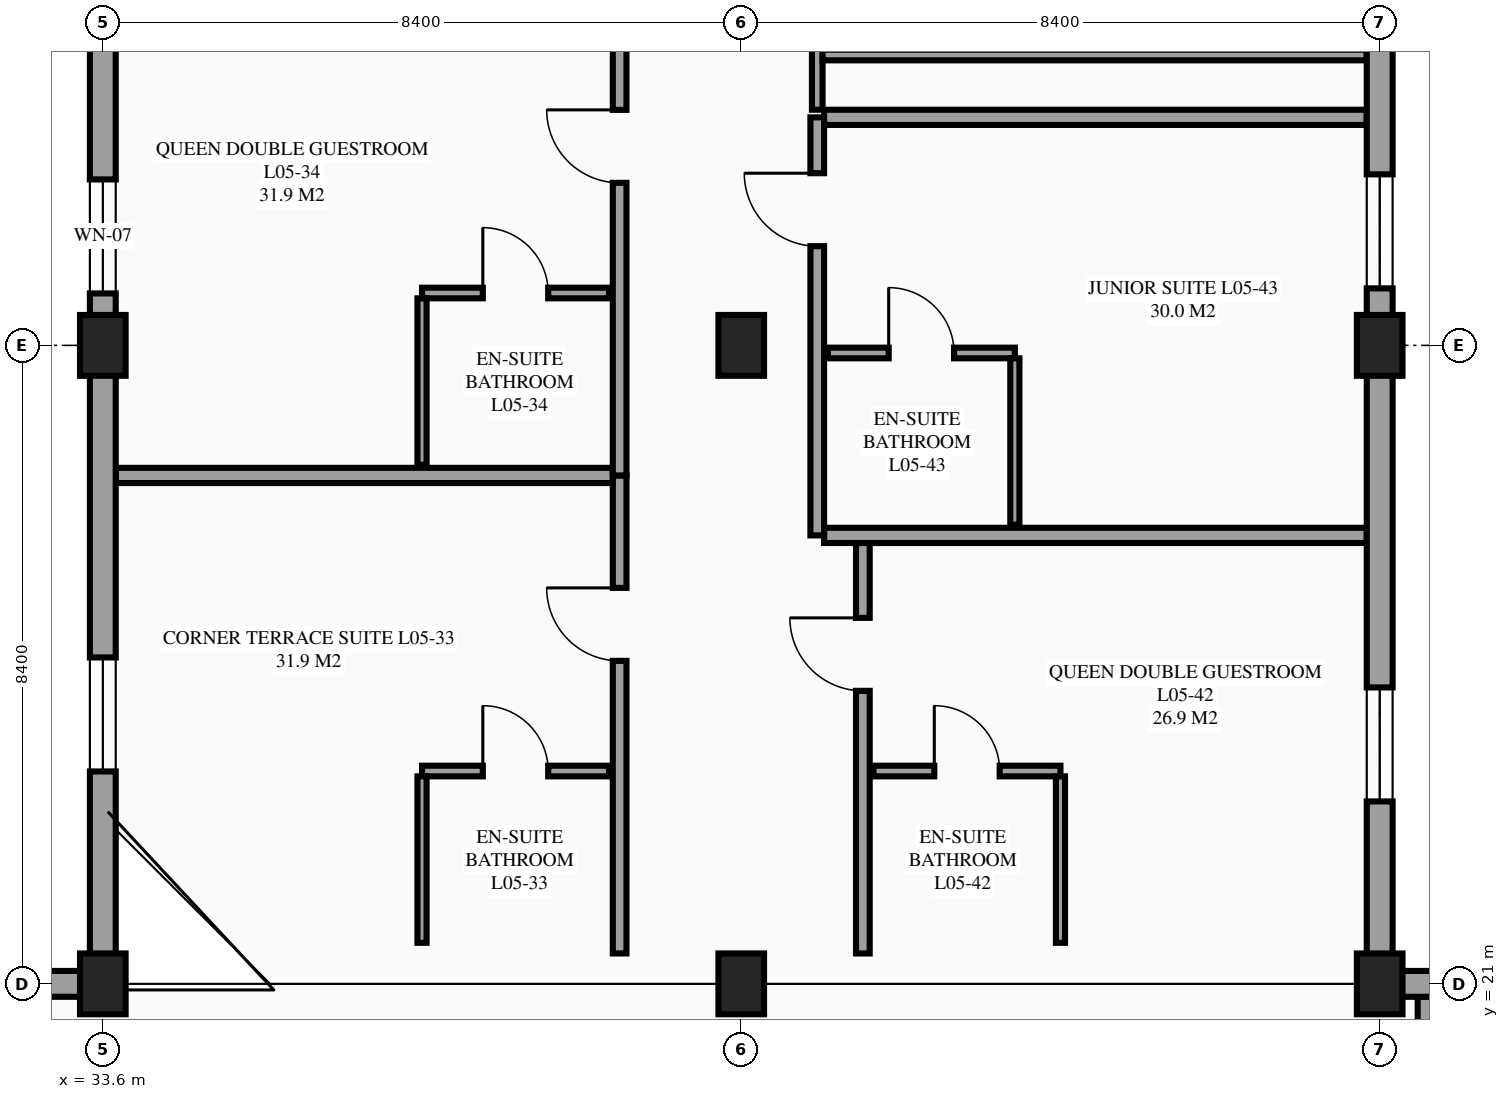
"""IFC4 building model, lengths in metres.
Left out: names, types, materials, properties, quantities, classifications, styles, units other than length and angle.
Written with IfcOpenShell. Run it as: python <this file> out.ifc"""

import sys

from ifc_helpers import new_model, si_unit, direction, frame, frame_2d, origin, origin_2d, place, context, subcontext, project, spatial, rectangle, extrude, element, fill, save


model = new_model("IFC4")
c1 = context("Model", 3, precision=1e-05, world=origin(), true_north=direction((0.0, 1.0)))
c2 = subcontext(c1, "Body", "Model", "MODEL_VIEW")
j1 = project(units=[si_unit("LENGTHUNIT", "METRE"), si_unit("PLANEANGLEUNIT", "RADIAN")], contexts=[c1])
p1 = place(None, origin())
s1 = spatial("IfcSite", under=j1, at=p1, CompositionType="ELEMENT")
p2 = place(p1, origin())
s2 = spatial("IfcBuilding", under=s1, at=p2, CompositionType="ELEMENT")
p3 = place(p2, frame((0.0, 0.0, 21.9)))
s3 = spatial("IfcBuildingStorey", under=s2, at=p3, CompositionType="ELEMENT", Elevation=21.9)
for number, where, z_axis, x_axis in (
    (1, (33.6, 21.0, 0.0), (0.0, 0.0, 1.0), (1.0, 0.0, 0.0)),
    (2, (33.6, 29.4, 0.0), (0.0, 0.0, 1.0), (1.0, 0.0, 0.0)),
    (3, (42.0, 21.0, 0.0), (0.0, 0.0, 1.0), (1.0, 0.0, 0.0)),
    (4, (42.0, 29.4, 0.0), (0.0, 0.0, 1.0), (1.0, 0.0, 0.0)),
    (5, (50.4, 21.0, 0.0), (0.0, 0.0, 1.0), (1.0, 0.0, 0.0)),
    (6, (50.4, 29.4, 0.0), (0.0, 0.0, 1.0), (1.0, 0.0, 0.0)),
):
    element("IfcColumn", number, at=place(p3, frame(where, z_axis=z_axis, x_axis=x_axis)), inside=s3, PredefinedType="COLUMN", context=c2, shape_type="SweptSolid", body=[
        extrude(rectangle(XDim=0.6, YDim=0.8, at=origin_2d()), origin(), (0.0, 0.0, 1.0), 3.6),
    ])
p4 = place(p3, frame((33.6, 46.2, 0.0), z_axis=(0.0, 0.0, 1.0), x_axis=(0.0, -1.0, 0.0)))
e7 = element("IfcWall", 7, at=p4, inside=s3, PredefinedType="STANDARD", context=c2, shape_type="SweptSolid", body=[
    extrude(rectangle(XDim=16.8, YDim=0.34, at=frame_2d((8.4, 0.0))), origin(), (0.0, 0.0, 1.0), 2.48),
])
p5 = place(p4, frame((14.617, 0.0, 0.85)))
e8 = element("IfcOpeningElement", 8, at=p5, cuts=e7, PredefinedType="OPENING", context=c2, shape_type="SweptSolid", body=[
    extrude(rectangle(XDim=1.5, YDim=1.5, at=frame_2d((0.75, 0.75))), frame((0.0, 0.18, 0.0), z_axis=(0.0, -1.0, 0.0), x_axis=(1.0, 0.0, 0.0)), (0.0, 0.0, 1.0), 0.36),
])
p6 = place(p4, frame((9.078, 0.0, 0.85)))
e9 = element("IfcOpeningElement", 9, at=p6, cuts=e7, PredefinedType="OPENING", context=c2, shape_type="SweptSolid", body=[
    extrude(rectangle(XDim=1.5, YDim=1.5, at=frame_2d((0.75, 0.75))), frame((0.0, 0.18, 0.0), z_axis=(0.0, -1.0, 0.0), x_axis=(1.0, 0.0, 0.0)), (0.0, 0.0, 1.0), 0.36),
])
p7 = place(p4, frame((2.039, 0.0, 0.85)))
e10 = element("IfcOpeningElement", 10, at=p7, cuts=e7, PredefinedType="OPENING", context=c2, shape_type="SweptSolid", body=[
    extrude(rectangle(XDim=1.5, YDim=1.5, at=frame_2d((0.75, 0.75))), frame((0.0, 0.18, 0.0), z_axis=(0.0, -1.0, 0.0), x_axis=(1.0, 0.0, 0.0)), (0.0, 0.0, 1.0), 0.36),
])
p8 = place(p3, frame((33.6, 21.0, 0.0), z_axis=(0.0, 0.0, 1.0), x_axis=(-1.0, 0.0, 0.0)))
e11 = element("IfcWall", 11, at=p8, inside=s3, PredefinedType="STANDARD", context=c2, shape_type="SweptSolid", body=[
    extrude(rectangle(XDim=2.0, YDim=0.34, at=frame_2d((1.0, 0.0))), origin(), (0.0, 0.0, 1.0), 2.58),
])
p9 = place(p3, frame((40.4, 21.4, 0.0), z_axis=(0.0, 0.0, 1.0), x_axis=(0.0, 1.0, 0.0)))
e12 = element("IfcWall", 12, at=p9, inside=s3, PredefinedType="PARTITIONING", context=c2, shape_type="SweptSolid", body=[
    extrude(rectangle(XDim=6.289, YDim=0.18, at=frame_2d((3.145, 0.0))), origin(), (0.0, 0.0, 1.0), 3.375),
])
p10 = place(p9, frame((3.849, 0.0, 0.0)))
e13 = element("IfcOpeningElement", 13, at=p10, cuts=e12, PredefinedType="OPENING", context=c2, shape_type="SweptSolid", body=[
    extrude(rectangle(XDim=0.96, YDim=2.15, at=frame_2d((0.48, 1.075))), frame((0.0, 0.1, 0.0), z_axis=(0.0, -1.0, 0.0), x_axis=(1.0, 0.0, 0.0)), (0.0, 0.0, 1.0), 0.2),
])
p11 = place(p3, frame((33.77, 27.689, 0.0), z_axis=(0.0, 0.0, 1.0), x_axis=(1.0, 0.0, 0.0)))
e14 = element("IfcWall", 14, at=p11, inside=s3, PredefinedType="PARTITIONING", context=c2, shape_type="SweptSolid", body=[
    extrude(rectangle(XDim=6.54, YDim=0.2, at=frame_2d((3.27, 0.0))), origin(), (0.0, 0.0, 1.0), 3.375),
])
p12 = place(p3, frame((37.8, 23.8, 0.0), z_axis=(0.0, 0.0, 1.0), x_axis=(1.0, 0.0, 0.0)))
e15 = element("IfcWall", 15, at=p12, inside=s3, PredefinedType="PARTITIONING", context=c2, shape_type="SweptSolid", body=[
    extrude(rectangle(XDim=2.46, YDim=0.14, at=frame_2d((1.23, 0.0))), origin(), (0.0, 0.0, 1.0), 3.375),
])
p13 = place(p12, frame((0.8, 0.0, 0.0)))
e16 = element("IfcOpeningElement", 16, at=p13, cuts=e15, PredefinedType="OPENING", context=c2, shape_type="SweptSolid", body=[
    extrude(rectangle(XDim=0.86, YDim=2.1, at=frame_2d((0.43, 1.05))), frame((0.0, 0.08, 0.0), z_axis=(0.0, -1.0, 0.0), x_axis=(1.0, 0.0, 0.0)), (0.0, 0.0, 1.0), 0.16),
])
p14 = place(p3, frame((37.8, 21.54, 0.0), z_axis=(0.0, 0.0, 1.0), x_axis=(0.0, 1.0, 0.0)))
e17 = element("IfcWall", 17, at=p14, inside=s3, PredefinedType="PARTITIONING", context=c2, shape_type="SweptSolid", body=[
    extrude(rectangle(XDim=2.19, YDim=0.12, at=frame_2d((1.095, 0.0))), origin(), (0.0, 0.0, 1.0), 3.375),
])
p15 = place(p3, frame((40.4, 27.689, 0.0), z_axis=(0.0, 0.0, 1.0), x_axis=(0.0, 1.0, 0.0)))
e18 = element("IfcWall", 18, at=p15, inside=s3, PredefinedType="PARTITIONING", context=c2, shape_type="SweptSolid", body=[
    extrude(rectangle(XDim=6.289, YDim=0.18, at=frame_2d((3.145, 0.0))), origin(), (0.0, 0.0, 1.0), 3.375),
])
p16 = place(p15, frame((3.849, 0.0, 0.0)))
e19 = element("IfcOpeningElement", 19, at=p16, cuts=e18, PredefinedType="OPENING", context=c2, shape_type="SweptSolid", body=[
    extrude(rectangle(XDim=0.96, YDim=2.15, at=frame_2d((0.48, 1.075))), frame((0.0, 0.1, 0.0), z_axis=(0.0, -1.0, 0.0), x_axis=(1.0, 0.0, 0.0)), (0.0, 0.0, 1.0), 0.2),
])
p17 = place(p3, frame((37.8, 30.089, 0.0), z_axis=(0.0, 0.0, 1.0), x_axis=(1.0, 0.0, 0.0)))
e20 = element("IfcWall", 20, at=p17, inside=s3, PredefinedType="PARTITIONING", context=c2, shape_type="SweptSolid", body=[
    extrude(rectangle(XDim=2.46, YDim=0.14, at=frame_2d((1.23, 0.0))), origin(), (0.0, 0.0, 1.0), 3.375),
])
p18 = place(p17, frame((0.8, 0.0, 0.0)))
e21 = element("IfcOpeningElement", 21, at=p18, cuts=e20, PredefinedType="OPENING", context=c2, shape_type="SweptSolid", body=[
    extrude(rectangle(XDim=0.86, YDim=2.1, at=frame_2d((0.43, 1.05))), frame((0.0, 0.08, 0.0), z_axis=(0.0, -1.0, 0.0), x_axis=(1.0, 0.0, 0.0)), (0.0, 0.0, 1.0), 0.16),
])
p19 = place(p3, frame((37.8, 27.829, 0.0), z_axis=(0.0, 0.0, 1.0), x_axis=(0.0, 1.0, 0.0)))
e22 = element("IfcWall", 22, at=p19, inside=s3, PredefinedType="PARTITIONING", context=c2, shape_type="SweptSolid", body=[
    extrude(rectangle(XDim=2.19, YDim=0.12, at=frame_2d((1.095, 0.0))), origin(), (0.0, 0.0, 1.0), 3.375),
])
p20 = place(p3, frame((43.6, 21.4, 0.0), z_axis=(0.0, 0.0, 1.0), x_axis=(0.0, 1.0, 0.0)))
e23 = element("IfcWall", 23, at=p20, inside=s3, PredefinedType="PARTITIONING", context=c2, shape_type="SweptSolid", body=[
    extrude(rectangle(XDim=5.5, YDim=0.18, at=frame_2d((2.75, 0.0))), origin(), (0.0, 0.0, 1.0), 3.375),
])
p21 = place(p20, frame((3.455, 0.0, 0.0)))
e24 = element("IfcOpeningElement", 24, at=p21, cuts=e23, PredefinedType="OPENING", context=c2, shape_type="SweptSolid", body=[
    extrude(rectangle(XDim=0.96, YDim=2.15, at=frame_2d((0.48, 1.075))), frame((0.0, 0.1, 0.0), z_axis=(0.0, -1.0, 0.0), x_axis=(1.0, 0.0, 0.0)), (0.0, 0.0, 1.0), 0.2),
])
p22 = place(p3, frame((43.09, 26.9, 0.0), z_axis=(0.0, 0.0, 1.0), x_axis=(1.0, 0.0, 0.0)))
e25 = element("IfcWall", 25, at=p22, inside=s3, PredefinedType="PARTITIONING", context=c2, shape_type="SweptSolid", body=[
    extrude(rectangle(XDim=7.14, YDim=0.2, at=frame_2d((3.57, 0.0))), origin(), (0.0, 0.0, 1.0), 3.375),
])
p23 = place(p3, frame((43.74, 23.8, 0.0), z_axis=(0.0, 0.0, 1.0), x_axis=(1.0, 0.0, 0.0)))
e26 = element("IfcWall", 26, at=p23, inside=s3, PredefinedType="PARTITIONING", context=c2, shape_type="SweptSolid", body=[
    extrude(rectangle(XDim=2.46, YDim=0.14, at=frame_2d((1.23, 0.0))), origin(), (0.0, 0.0, 1.0), 3.375),
])
p24 = place(p23, frame((0.8, 0.0, 0.0)))
e27 = element("IfcOpeningElement", 27, at=p24, cuts=e26, PredefinedType="OPENING", context=c2, shape_type="SweptSolid", body=[
    extrude(rectangle(XDim=0.86, YDim=2.1, at=frame_2d((0.43, 1.05))), frame((0.0, 0.08, 0.0), z_axis=(0.0, -1.0, 0.0), x_axis=(1.0, 0.0, 0.0)), (0.0, 0.0, 1.0), 0.16),
])
p25 = place(p3, frame((46.2, 21.54, 0.0), z_axis=(0.0, 0.0, 1.0), x_axis=(0.0, 1.0, 0.0)))
e28 = element("IfcWall", 28, at=p25, inside=s3, PredefinedType="PARTITIONING", context=c2, shape_type="SweptSolid", body=[
    extrude(rectangle(XDim=2.19, YDim=0.12, at=frame_2d((1.095, 0.0))), origin(), (0.0, 0.0, 1.0), 3.375),
])
p26 = place(p3, frame((43.0, 26.9, 0.0), z_axis=(0.0, 0.0, 1.0), x_axis=(0.0, 1.0, 0.0)))
e29 = element("IfcWall", 29, at=p26, inside=s3, PredefinedType="PARTITIONING", context=c2, shape_type="SweptSolid", body=[
    extrude(rectangle(XDim=5.5, YDim=0.18, at=frame_2d((2.75, 0.0))), origin(), (0.0, 0.0, 1.0), 3.375),
])
p27 = place(p26, frame((3.805, 0.0, 0.0)))
e30 = element("IfcOpeningElement", 30, at=p27, cuts=e29, PredefinedType="OPENING", context=c2, shape_type="SweptSolid", body=[
    extrude(rectangle(XDim=0.96, YDim=2.15, at=frame_2d((0.48, 1.075))), frame((0.0, 0.1, 0.0), z_axis=(0.0, -1.0, 0.0), x_axis=(1.0, 0.0, 0.0)), (0.0, 0.0, 1.0), 0.2),
])
p28 = place(p3, frame((43.09, 32.4, 0.0), z_axis=(0.0, 0.0, 1.0), x_axis=(1.0, 0.0, 0.0)))
e31 = element("IfcWall", 31, at=p28, inside=s3, PredefinedType="PARTITIONING", context=c2, shape_type="SweptSolid", body=[
    extrude(rectangle(XDim=7.14, YDim=0.2, at=frame_2d((3.57, 0.0))), origin(), (0.0, 0.0, 1.0), 3.375),
])
p29 = place(p3, frame((43.14, 29.3, 0.0), z_axis=(0.0, 0.0, 1.0), x_axis=(1.0, 0.0, 0.0)))
e32 = element("IfcWall", 32, at=p29, inside=s3, PredefinedType="PARTITIONING", context=c2, shape_type="SweptSolid", body=[
    extrude(rectangle(XDim=2.46, YDim=0.14, at=frame_2d((1.23, 0.0))), origin(), (0.0, 0.0, 1.0), 2.53),
])
p30 = place(p29, frame((0.8, 0.0, 0.0)))
e33 = element("IfcOpeningElement", 33, at=p30, cuts=e32, PredefinedType="OPENING", context=c2, shape_type="SweptSolid", body=[
    extrude(rectangle(XDim=0.86, YDim=2.1, at=frame_2d((0.43, 1.05))), frame((0.0, 0.08, 0.0), z_axis=(0.0, -1.0, 0.0), x_axis=(1.0, 0.0, 0.0)), (0.0, 0.0, 1.0), 0.16),
])
p31 = place(p3, frame((45.6, 27.04, 0.0), z_axis=(0.0, 0.0, 1.0), x_axis=(0.0, 1.0, 0.0)))
e34 = element("IfcWall", 34, at=p31, inside=s3, PredefinedType="PARTITIONING", context=c2, shape_type="SweptSolid", body=[
    extrude(rectangle(XDim=2.19, YDim=0.12, at=frame_2d((1.095, 0.0))), origin(), (0.0, 0.0, 1.0), 3.375),
])
p32 = place(p3, frame((51.02, 14.74, 0.0), z_axis=(0.0, 0.0, 1.0), x_axis=(0.0, 1.0, 0.0)))
e35 = element("IfcWall", 35, at=p32, inside=s3, PredefinedType="PARTITIONING", context=c2, shape_type="SweptSolid", body=[
    extrude(rectangle(XDim=6.09, YDim=0.24, at=frame_2d((3.045, 0.0))), origin(), (0.0, 0.0, 1.0), 3.375),
])
p33 = place(p3, frame((43.0, 32.5, 0.0), z_axis=(0.0, 0.0, 1.0), x_axis=(0.0, 1.0, 0.0)))
e36 = element("IfcWall", 36, at=p33, inside=s3, PredefinedType="PARTITIONING", context=c2, shape_type="SweptSolid", body=[
    extrude(rectangle(XDim=4.8, YDim=0.14, at=frame_2d((2.4, 0.0))), origin(), (0.0, 0.0, 1.0), 3.375),
])
p34 = place(p33, frame((2.05, 0.0, 0.0)))
e37 = element("IfcOpeningElement", 37, at=p34, cuts=e36, PredefinedType="OPENING", context=c2, shape_type="SweptSolid", body=[
    extrude(rectangle(XDim=0.9, YDim=2.12, at=frame_2d((0.45, 1.06))), frame((0.0, 0.08, 0.0), z_axis=(0.0, -1.0, 0.0), x_axis=(1.0, 0.0, 0.0)), (0.0, 0.0, 1.0), 0.16),
])
p35 = place(p3, frame((43.07, 33.22, 0.0), z_axis=(0.0, 0.0, 1.0), x_axis=(1.0, 0.0, 0.0)))
e38 = element("IfcWall", 38, at=p35, inside=s3, PredefinedType="PARTITIONING", context=c2, shape_type="SweptSolid", body=[
    extrude(rectangle(XDim=7.16, YDim=0.14, at=frame_2d((3.58, 0.0))), origin(), (0.0, 0.0, 1.0), 3.375),
])
p36 = place(p3, frame((58.8, 21.0, 0.0), z_axis=(0.0, 0.0, 1.0), x_axis=(-1.0, 0.0, 0.0)))
e39 = element("IfcWall", 39, at=p36, inside=s3, PredefinedType="STANDARD", context=c2, shape_type="SweptSolid", body=[
    extrude(rectangle(XDim=8.4, YDim=0.34, at=frame_2d((4.2, 0.0))), origin(), (0.0, 0.0, 1.0), 2.63),
])
p37 = place(p36, frame((3.3, 0.0, 0.75)))
e40 = element("IfcOpeningElement", 40, at=p37, cuts=e39, PredefinedType="OPENING", context=c2, shape_type="SweptSolid", body=[
    extrude(rectangle(XDim=1.8, YDim=1.5, at=frame_2d((0.9, 0.75))), frame((0.0, 0.18, 0.0), z_axis=(0.0, -1.0, 0.0), x_axis=(1.0, 0.0, 0.0)), (0.0, 0.0, 1.0), 0.36),
])
p38 = place(p3, frame((50.4, 21.0, 0.0), z_axis=(0.0, 0.0, 1.0), x_axis=(0.0, 1.0, 0.0)))
e41 = element("IfcWall", 41, at=p38, inside=s3, PredefinedType="STANDARD", context=c2, shape_type="SweptSolid", body=[
    extrude(rectangle(XDim=8.4, YDim=0.34, at=frame_2d((4.2, 0.0))), origin(), (0.0, 0.0, 1.0), 2.68),
])
p39 = place(p38, frame((2.4, 0.0, 0.85)))
e42 = element("IfcOpeningElement", 42, at=p39, cuts=e41, PredefinedType="OPENING", context=c2, shape_type="SweptSolid", body=[
    extrude(rectangle(XDim=1.5, YDim=1.5, at=frame_2d((0.75, 0.75))), frame((0.0, 0.18, 0.0), z_axis=(0.0, -1.0, 0.0), x_axis=(1.0, 0.0, 0.0)), (0.0, 0.0, 1.0), 0.36),
])
p40 = place(p3, frame((50.4, 29.4, 0.0), z_axis=(0.0, 0.0, 1.0), x_axis=(0.0, 1.0, 0.0)))
e43 = element("IfcWall", 43, at=p40, inside=s3, PredefinedType="STANDARD", context=c2, shape_type="SweptSolid", body=[
    extrude(rectangle(XDim=8.4, YDim=0.34, at=frame_2d((4.2, 0.0))), origin(), (0.0, 0.0, 1.0), 2.78),
])
p41 = place(p40, frame((0.75, 0.0, 0.85)))
e44 = element("IfcOpeningElement", 44, at=p41, cuts=e43, PredefinedType="OPENING", context=c2, shape_type="SweptSolid", body=[
    extrude(rectangle(XDim=1.5, YDim=1.5, at=frame_2d((0.75, 0.75))), frame((0.0, 0.18, 0.0), z_axis=(0.0, -1.0, 0.0), x_axis=(1.0, 0.0, 0.0)), (0.0, 0.0, 1.0), 0.36),
])
p42 = place(p3, frame((33.6, 29.4, 0.0), z_axis=(0.0, 0.0, 1.0), x_axis=(0.0, -1.0, 0.0)))
e45 = element("IfcWall", 45, at=p42, inside=s3, PredefinedType="STANDARD", context=c2, shape_type="SweptSolid", body=[
    extrude(rectangle(XDim=8.4, YDim=0.34, at=frame_2d((4.2, 0.0))), origin(), (0.0, 0.0, 1.0), 2.88),
])
p43 = place(p42, frame((4.106, 0.0, 0.85)))
e46 = element("IfcOpeningElement", 46, at=p43, cuts=e45, PredefinedType="OPENING", context=c2, shape_type="SweptSolid", body=[
    extrude(rectangle(XDim=1.5, YDim=1.5, at=frame_2d((0.75, 0.75))), frame((0.0, 0.18, 0.0), z_axis=(0.0, -1.0, 0.0), x_axis=(1.0, 0.0, 0.0)), (0.0, 0.0, 1.0), 0.36),
])
p44 = place(p43, origin())
e47 = element("IfcWindow", 47, at=p44, inside=s3, PartitioningType="SINGLE_PANEL", PredefinedType="WINDOW", context=c2, shape_type="SweptSolid", body=[
    extrude(rectangle(XDim=1.5, YDim=1.5, at=frame_2d((0.75, 0.75))), frame((0.0, 0.03, 0.0), z_axis=(0.0, -1.0, 0.0), x_axis=(1.0, 0.0, 0.0)), (0.0, 0.0, 1.0), 0.06),
])
fill(e46, e47)
p45 = place(p5, origin())
e48 = element("IfcWindow", 48, at=p45, inside=s3, PartitioningType="SINGLE_PANEL", PredefinedType="WINDOW", context=c2, shape_type="SweptSolid", body=[
    extrude(rectangle(XDim=1.5, YDim=1.5, at=frame_2d((0.75, 0.75))), frame((0.0, 0.03, 0.0), z_axis=(0.0, -1.0, 0.0), x_axis=(1.0, 0.0, 0.0)), (0.0, 0.0, 1.0), 0.06),
])
fill(e8, e48)
p46 = place(p39, origin())
e49 = element("IfcWindow", 49, at=p46, inside=s3, PartitioningType="SINGLE_PANEL", PredefinedType="WINDOW", context=c2, shape_type="SweptSolid", body=[
    extrude(rectangle(XDim=1.5, YDim=1.5, at=frame_2d((0.75, 0.75))), frame((0.0, 0.03, 0.0), z_axis=(0.0, -1.0, 0.0), x_axis=(1.0, 0.0, 0.0)), (0.0, 0.0, 1.0), 0.06),
])
fill(e42, e49)
p47 = place(p41, origin())
e50 = element("IfcWindow", 50, at=p47, inside=s3, PartitioningType="SINGLE_PANEL", PredefinedType="WINDOW", context=c2, shape_type="SweptSolid", body=[
    extrude(rectangle(XDim=1.5, YDim=1.5, at=frame_2d((0.75, 0.75))), frame((0.0, 0.03, 0.0), z_axis=(0.0, -1.0, 0.0), x_axis=(1.0, 0.0, 0.0)), (0.0, 0.0, 1.0), 0.06),
])
fill(e44, e50)
p48 = place(p10, origin())
e51 = element("IfcDoor", 51, at=p48, inside=s3, OperationType="SINGLE_SWING_RIGHT", PredefinedType="DOOR", context=c2, shape_type="SweptSolid", body=[
    extrude(rectangle(XDim=0.96, YDim=2.15, at=frame_2d((0.48, 1.075))), frame((0.0, 0.025, 0.0), z_axis=(0.0, -1.0, 0.0), x_axis=(1.0, 0.0, 0.0)), (0.0, 0.0, 1.0), 0.05),
])
fill(e13, e51)
p49 = place(p13, origin())
e52 = element("IfcDoor", 52, at=p49, inside=s3, OperationType="SINGLE_SWING_LEFT", PredefinedType="DOOR", context=c2, shape_type="SweptSolid", body=[
    extrude(rectangle(XDim=0.86, YDim=2.1, at=frame_2d((0.43, 1.05))), frame((0.0, 0.025, 0.0), z_axis=(0.0, -1.0, 0.0), x_axis=(1.0, 0.0, 0.0)), (0.0, 0.0, 1.0), 0.05),
])
fill(e16, e52)
p50 = place(p16, origin())
e53 = element("IfcDoor", 53, at=p50, inside=s3, OperationType="SINGLE_SWING_RIGHT", PredefinedType="DOOR", context=c2, shape_type="SweptSolid", body=[
    extrude(rectangle(XDim=0.96, YDim=2.15, at=frame_2d((0.48, 1.075))), frame((0.0, 0.025, 0.0), z_axis=(0.0, -1.0, 0.0), x_axis=(1.0, 0.0, 0.0)), (0.0, 0.0, 1.0), 0.05),
])
fill(e19, e53)
p51 = place(p18, origin())
e54 = element("IfcDoor", 54, at=p51, inside=s3, OperationType="SINGLE_SWING_LEFT", PredefinedType="DOOR", context=c2, shape_type="SweptSolid", body=[
    extrude(rectangle(XDim=0.86, YDim=2.1, at=frame_2d((0.43, 1.05))), frame((0.0, 0.025, 0.0), z_axis=(0.0, -1.0, 0.0), x_axis=(1.0, 0.0, 0.0)), (0.0, 0.0, 1.0), 0.05),
])
fill(e21, e54)
p52 = place(p21, origin())
e55 = element("IfcDoor", 55, at=p52, inside=s3, OperationType="SINGLE_SWING_RIGHT", PredefinedType="DOOR", context=c2, shape_type="SweptSolid", body=[
    extrude(rectangle(XDim=0.96, YDim=2.15, at=frame_2d((0.48, 1.075))), frame((0.0, 0.025, 0.0), z_axis=(0.0, -1.0, 0.0), x_axis=(1.0, 0.0, 0.0)), (0.0, 0.0, 1.0), 0.05),
])
fill(e24, e55)
p53 = place(p24, origin())
e56 = element("IfcDoor", 56, at=p53, inside=s3, OperationType="SINGLE_SWING_LEFT", PredefinedType="DOOR", context=c2, shape_type="SweptSolid", body=[
    extrude(rectangle(XDim=0.86, YDim=2.1, at=frame_2d((0.43, 1.05))), frame((0.0, 0.025, 0.0), z_axis=(0.0, -1.0, 0.0), x_axis=(1.0, 0.0, 0.0)), (0.0, 0.0, 1.0), 0.05),
])
fill(e27, e56)
p54 = place(p27, origin())
e57 = element("IfcDoor", 57, at=p54, inside=s3, OperationType="SINGLE_SWING_RIGHT", PredefinedType="DOOR", context=c2, shape_type="SweptSolid", body=[
    extrude(rectangle(XDim=0.96, YDim=2.15, at=frame_2d((0.48, 1.075))), frame((0.0, 0.025, 0.0), z_axis=(0.0, -1.0, 0.0), x_axis=(1.0, 0.0, 0.0)), (0.0, 0.0, 1.0), 0.05),
])
fill(e30, e57)
p55 = place(p30, origin())
e58 = element("IfcDoor", 58, at=p55, inside=s3, OperationType="SINGLE_SWING_LEFT", PredefinedType="DOOR", context=c2, shape_type="SweptSolid", body=[
    extrude(rectangle(XDim=0.86, YDim=2.1, at=frame_2d((0.43, 1.05))), frame((0.0, 0.025, 0.0), z_axis=(0.0, -1.0, 0.0), x_axis=(1.0, 0.0, 0.0)), (0.0, 0.0, 1.0), 0.05),
])
fill(e33, e58)
save(model, sys.argv[1])
